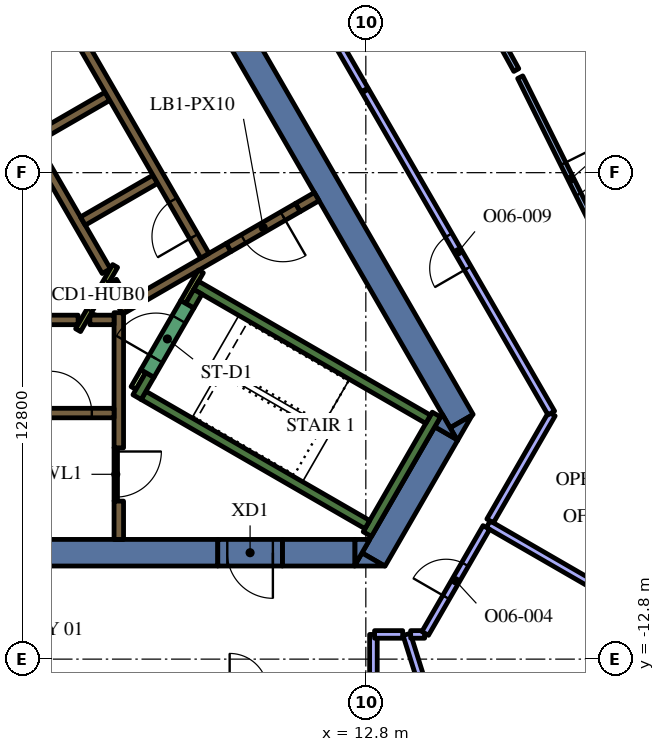
"""IFC4 building model, lengths in metres.
Left out: names, types, materials, properties, quantities, classifications, styles, units other than length and angle.
Written with IfcOpenShell. Run it as: python <this file> out.ifc"""

import sys

from ifc_helpers import new_model, si_unit, direction, frame, frame_2d, origin, place, context, subcontext, project, spatial, polyline, rectangle, outline, extrude, element, fill, save


model = new_model("IFC4")
c1 = context("Model", 3, precision=1e-05, world=origin(), true_north=direction((0.0, 1.0)))
c2 = subcontext(c1, "Body", "Model", "MODEL_VIEW")
j1 = project(units=[si_unit("LENGTHUNIT", "METRE"), si_unit("PLANEANGLEUNIT", "RADIAN")], contexts=[c1])
p1 = place(None, origin())
s1 = spatial("IfcSite", under=j1, at=p1, CompositionType="ELEMENT")
p2 = place(p1, origin())
s2 = spatial("IfcBuilding", under=s1, at=p2, CompositionType="ELEMENT")
p3 = place(p2, frame((0.0, 0.0, 201.6)))
s3 = spatial("IfcBuildingStorey", under=s2, at=p3, CompositionType="ELEMENT", Elevation=201.6)
p4 = place(p3, frame((9.085, 4.264, 0.0), z_axis=(0.0, 0.0, 1.0), x_axis=(0.499998082512, -0.866026510844, 0.0)))
e1 = element("IfcWall", 1, at=p4, inside=s3, PredefinedType="SOLIDWALL", context=c2, shape_type="SweptSolid", body=[
    extrude(rectangle(XDim=12.472, YDim=0.7, at=frame_2d((6.236, 0.0))), origin(), (0.0, 0.0, 1.0), 4.2),
])
p5 = place(p3, origin())
e2 = element("IfcWall", 2, at=p5, inside=s3, PredefinedType="SOLIDWALL", context=c2, shape_type="SweptSolid", body=[
    extrude(outline(polyline([(15.213, -7.05), (15.019, -6.714), (15.601, -6.378), (15.213, -7.05)])), origin(), (0.0, 0.0, 1.0), 4.2),
])
p6 = place(p3, frame((13.003, -10.179, 0.0), z_axis=(0.0, 0.0, 1.0), x_axis=(0.499972675833, 0.866041178825, 0.0)))
e3 = element("IfcWall", 3, at=p6, inside=s3, PredefinedType="SOLIDWALL", context=c2, shape_type="SweptSolid", body=[
    extrude(rectangle(XDim=3.829, YDim=0.7, at=frame_2d((1.915, 0.0))), origin(), (0.0, 0.0, 1.0), 4.2),
])
e4 = element("IfcWall", 4, at=p5, inside=s3, PredefinedType="SOLIDWALL", context=c2, shape_type="SweptSolid", body=[
    extrude(outline(polyline([(12.5, -10.35), (12.698, -10.005), (13.296, -10.35), (12.5, -10.35)])), origin(), (0.0, 0.0, 1.0), 4.2),
])
e5 = element("IfcWall", 5, at=p5, inside=s3, PredefinedType="SOLIDWALL", context=c2, shape_type="SweptSolid", body=[
    extrude(outline(polyline([(14.809, -6.35), (15.197, -7.022), (14.615, -6.686), (14.809, -6.35)])), origin(), (0.0, 0.0, 1.0), 4.2),
])
p7 = place(p3, frame((10.604, -10.0, 0.0), z_axis=(0.0, 0.0, 1.0), x_axis=(1.0, 0.0, 0.0)))
e6 = element("IfcWall", 6, at=p7, inside=s3, PredefinedType="SOLIDWALL", context=c2, shape_type="SweptSolid", body=[
    extrude(rectangle(XDim=1.909, YDim=0.7, at=frame_2d((0.955, 0.0))), origin(), (0.0, 0.0, 1.0), 4.2),
])
e7 = element("IfcWall", 7, at=p5, inside=s3, PredefinedType="SOLIDWALL", context=c2, shape_type="SweptSolid", body=[
    extrude(outline(polyline([(12.904, -9.65), (12.516, -10.322), (12.516, -9.65), (12.904, -9.65)])), origin(), (0.0, 0.0, 1.0), 4.2),
])
p8 = place(p3, frame((8.904, -10.0, 0.0), z_axis=(0.0, 0.0, 1.0), x_axis=(-1.0, 0.0, 0.0)))
e8 = element("IfcWall", 8, at=p8, inside=s3, PredefinedType="SOLIDWALL", context=c2, shape_type="SweptSolid", body=[
    extrude(rectangle(XDim=22.226, YDim=0.7, at=frame_2d((11.113, 0.0))), origin(), (0.0, 0.0, 1.0), 4.2),
])
p9 = place(p3, frame((12.84, -9.511, 0.0), z_axis=(0.0, 0.0, 1.0), x_axis=(0.500048121057, 0.865997619297, 0.0)))
e9 = element("IfcWall", 9, at=p9, inside=s3, PredefinedType="SOLIDWALL", context=c2, shape_type="SweptSolid", body=[
    extrude(rectangle(XDim=3.634, YDim=0.25, at=frame_2d((1.817, 0.0))), origin(), (0.0, 0.0, 1.0), 4.2),
])
p10 = place(p3, frame((12.84, -9.261, 0.0), z_axis=(0.0, 0.0, 1.0), x_axis=(-0.866013990052, 0.500019768644, 0.0)))
e10 = element("IfcWall", 10, at=p10, inside=s3, PredefinedType="SOLIDWALL", context=c2, shape_type="SweptSolid", body=[
    extrude(rectangle(XDim=6.8, YDim=0.25, at=frame_2d((3.4, 0.0))), origin(), (0.0, 0.0, 1.0), 4.2),
])
p11 = place(p3, frame((6.78, -5.906, 0.0), z_axis=(0.0, 0.0, 1.0), x_axis=(0.500223362819, 0.865896406789, 0.0)))
e11 = element("IfcWall", 11, at=p11, inside=s3, PredefinedType="SOLIDWALL", context=c2, shape_type="SweptSolid", body=[
    extrude(rectangle(XDim=0.675, YDim=0.25, at=frame_2d((0.337, 0.0))), origin(), (0.0, 0.0, 1.0), 4.2),
])
p12 = place(p3, frame((8.334, -2.964, 0.0), z_axis=(0.0, 0.0, 1.0), x_axis=(0.866016039709, -0.500016218704, 0.0)))
e12 = element("IfcWall", 12, at=p12, inside=s3, PredefinedType="SOLIDWALL", context=c2, shape_type="SweptSolid", body=[
    extrude(rectangle(XDim=7.05, YDim=0.25, at=frame_2d((3.525, 0.0))), origin(), (0.0, 0.0, 1.0), 4.2),
])
p13 = place(p3, frame((8.168, -3.503, 0.0), z_axis=(0.0, 0.0, 1.0), x_axis=(0.49972245349, 0.866185586049, 0.0)))
e13 = element("IfcWall", 13, at=p13, inside=s3, PredefinedType="SOLIDWALL", context=c2, shape_type="SweptSolid", body=[
    extrude(rectangle(XDim=0.425, YDim=0.25, at=frame_2d((0.212, 0.0))), origin(), (0.0, 0.0, 1.0), 4.2),
])
p14 = place(p3, frame((-5.259, -3.875, 0.0), z_axis=(0.0, 0.0, 1.0), x_axis=(1.0, 0.0, 0.0)))
e14 = element("IfcWall", 14, at=p14, inside=s3, PredefinedType="SOLIDWALL", context=c2, shape_type="SweptSolid", body=[
    extrude(rectangle(XDim=10.489, YDim=0.25, at=frame_2d((5.244, 0.0))), origin(), (0.0, 0.0, 1.0), 4.2),
])
p15 = place(p3, frame((6.3, -7.24, 0.0), z_axis=(0.0, 0.0, 1.0), x_axis=(0.0, 1.0, 0.0)))
e15 = element("IfcWall", 15, at=p15, inside=s3, PredefinedType="SOLIDWALL", context=c2, shape_type="SweptSolid", body=[
    extrude(rectangle(XDim=3.556, YDim=0.25, at=frame_2d((1.778, 0.0))), origin(), (0.0, 0.0, 1.0), 4.2),
])
p16 = place(p3, frame((6.3, -9.65, 0.0), z_axis=(0.0, 0.0, 1.0), x_axis=(0.0, 1.0, 0.0)))
e16 = element("IfcWall", 16, at=p16, inside=s3, PredefinedType="SOLIDWALL", context=c2, shape_type="SweptSolid", body=[
    extrude(rectangle(XDim=1.008, YDim=0.25, at=frame_2d((0.504, 0.0))), origin(), (0.0, 0.0, 1.0), 4.2),
])
p17 = place(p3, frame((5.538, -3.875, 0.0), z_axis=(0.0, 0.0, 1.0), x_axis=(1.0, 0.0, 0.0)))
e17 = element("IfcWall", 17, at=p17, inside=s3, PredefinedType="SOLIDWALL", context=c2, shape_type="SweptSolid", body=[
    extrude(rectangle(XDim=0.637, YDim=0.25, at=frame_2d((0.318, 0.0))), origin(), (0.0, 0.0, 1.0), 4.2),
])
p18 = place(p3, frame((9.19, -1.969, 0.0), z_axis=(0.0, 0.0, 1.0), x_axis=(-0.866057109641, -0.499945079824, 0.0)))
e18 = element("IfcWall", 18, at=p18, inside=s3, PredefinedType="SOLIDWALL", context=c2, shape_type="SweptSolid", body=[
    extrude(rectangle(XDim=3.291, YDim=0.25, at=frame_2d((1.646, 0.0))), origin(), (0.0, 0.0, 1.0), 4.2),
])
p19 = place(p3, frame((6.13, -2.867, 0.0), z_axis=(0.0, 0.0, 1.0), x_axis=(0.500160776593, -0.865932559475, 0.0)))
e19 = element("IfcWall", 19, at=p19, inside=s3, PredefinedType="SOLIDWALL", context=c2, shape_type="SweptSolid", body=[
    extrude(rectangle(XDim=0.627, YDim=0.25, at=frame_2d((0.313, 0.0))), origin(), (0.0, 0.0, 1.0), 4.2),
])
p20 = place(p3, frame((11.507, -0.631, 0.0), z_axis=(0.0, 0.0, 1.0), x_axis=(-0.866093731455, -0.499881634324, 0.0)))
e20 = element("IfcWall", 20, at=p20, inside=s3, PredefinedType="SOLIDWALL", context=c2, shape_type="SweptSolid", body=[
    extrude(rectangle(XDim=0.575, YDim=0.25, at=frame_2d((0.288, 0.0))), origin(), (0.0, 0.0, 1.0), 4.2),
])
p21 = place(p3, frame((5.97, -2.591, 0.0), z_axis=(0.0, 0.0, 1.0), x_axis=(-0.499994469932, 0.866028596547, 0.0)))
e21 = element("IfcWall", 21, at=p21, inside=s3, PredefinedType="SOLIDWALL", context=c2, shape_type="SweptSolid", body=[
    extrude(rectangle(XDim=10.488, YDim=0.25, at=frame_2d((5.244, 0.0))), origin(), (0.0, 0.0, 1.0), 4.2),
])
for number, where, z_axis, x_axis in (
    (22, (2.834, 3.091, 0.0), (0.0, 0.0, 1.0), (0.866, 0.5, 0.0)),
    (23, (4.094, 0.909, 0.0), (0.0, 0.0, 1.0), (0.866, 0.5, 0.0)),
    (24, (5.354, -1.274, 0.0), (0.0, 0.0, 1.0), (0.866, 0.5, 0.0)),
):
    element("IfcWall", number, at=place(p3, frame(where, z_axis=z_axis, x_axis=x_axis)), inside=s3, PredefinedType="SOLIDWALL", context=c2, shape_type="SweptSolid", body=[
        extrude(rectangle(XDim=2.2, YDim=0.25, at=frame_2d((1.1, 0.0))), origin(), (0.0, 0.0, 1.0), 4.2),
    ])
p22 = place(p3, frame((6.945, -5.222, 0.0), z_axis=(0.0, 0.0, 1.0), x_axis=(-0.499818422106, -0.866130212453, 0.0)))
e25 = element("IfcWall", 25, at=p22, inside=s3, PredefinedType="PARTITIONING", context=c2, shape_type="SweptSolid", body=[
    extrude(rectangle(XDim=0.514, YDim=0.15, at=frame_2d((0.257, 0.0))), origin(), (0.0, 0.0, 1.0), 3.45),
])
p23 = place(p3, frame((8.459, -2.599, 0.0), z_axis=(0.0, 0.0, 1.0), x_axis=(-0.500041054325, -0.866001699761, 0.0)))
e26 = element("IfcWall", 26, at=p23, inside=s3, PredefinedType="PARTITIONING", context=c2, shape_type="SweptSolid", body=[
    extrude(rectangle(XDim=0.929, YDim=0.15, at=frame_2d((0.464, 0.0))), origin(), (0.0, 0.0, 1.0), 4.2),
])
p24 = place(p3, frame((-6.175, -6.325, 0.0), z_axis=(0.0, 0.0, 1.0), x_axis=(1.0, 0.0, 0.0)))
e27 = element("IfcWall", 27, at=p24, inside=s3, PredefinedType="SOLIDWALL", context=c2, shape_type="SweptSolid", body=[
    extrude(rectangle(XDim=12.35, YDim=0.25, at=frame_2d((6.175, 0.0))), origin(), (0.0, 0.0, 1.0), 4.2),
])
p25 = place(p24, frame((0.585, 0.0, 0.0)))
e28 = element("IfcOpeningElement", 28, at=p25, cuts=e27, PredefinedType="OPENING", context=c2, shape_type="SweptSolid", body=[
    extrude(rectangle(XDim=1.1, YDim=2.1, at=frame_2d((0.55, 1.05))), frame((0.0, 0.135, 0.0), z_axis=(0.0, -1.0, 0.0), x_axis=(1.0, 0.0, 0.0)), (0.0, 0.0, 1.0), 0.27),
])
p26 = place(p24, frame((3.105, 0.0, 0.0)))
e29 = element("IfcOpeningElement", 29, at=p26, cuts=e27, PredefinedType="OPENING", context=c2, shape_type="SweptSolid", body=[
    extrude(rectangle(XDim=1.1, YDim=2.1, at=frame_2d((0.55, 1.05))), frame((0.0, 0.135, 0.0), z_axis=(0.0, -1.0, 0.0), x_axis=(1.0, 0.0, 0.0)), (0.0, 0.0, 1.0), 0.27),
])
p27 = place(p24, frame((5.625, 0.0, 0.0)))
e30 = element("IfcOpeningElement", 30, at=p27, cuts=e27, PredefinedType="OPENING", context=c2, shape_type="SweptSolid", body=[
    extrude(rectangle(XDim=1.1, YDim=2.1, at=frame_2d((0.55, 1.05))), frame((0.0, 0.135, 0.0), z_axis=(0.0, -1.0, 0.0), x_axis=(1.0, 0.0, 0.0)), (0.0, 0.0, 1.0), 0.27),
])
p28 = place(p24, frame((8.145, 0.0, 0.0)))
e31 = element("IfcOpeningElement", 31, at=p28, cuts=e27, PredefinedType="OPENING", context=c2, shape_type="SweptSolid", body=[
    extrude(rectangle(XDim=1.1, YDim=2.1, at=frame_2d((0.55, 1.05))), frame((0.0, 0.135, 0.0), z_axis=(0.0, -1.0, 0.0), x_axis=(1.0, 0.0, 0.0)), (0.0, 0.0, 1.0), 0.27),
])
p29 = place(p24, frame((10.665, 0.0, 0.0)))
e32 = element("IfcOpeningElement", 32, at=p29, cuts=e27, PredefinedType="OPENING", context=c2, shape_type="SweptSolid", body=[
    extrude(rectangle(XDim=1.1, YDim=2.1, at=frame_2d((0.55, 1.05))), frame((0.0, 0.135, 0.0), z_axis=(0.0, -1.0, 0.0), x_axis=(1.0, 0.0, 0.0)), (0.0, 0.0, 1.0), 0.27),
])
p30 = place(p3, frame((8.565, -2.185, 0.0), z_axis=(0.0, 0.0, 1.0), x_axis=(-0.499997954832, 0.866026584559, 0.0)))
e33 = element("IfcWall", 33, at=p30, inside=s3, PredefinedType="SOLIDWALL", context=c2, shape_type="SweptSolid", body=[
    extrude(rectangle(XDim=12.35, YDim=0.25, at=frame_2d((6.175, 0.0))), origin(), (0.0, 0.0, 1.0), 4.2),
])
p31 = place(p30, frame((0.585, 0.0, 0.0)))
e34 = element("IfcOpeningElement", 34, at=p31, cuts=e33, PredefinedType="OPENING", context=c2, shape_type="SweptSolid", body=[
    extrude(rectangle(XDim=1.1, YDim=2.1, at=frame_2d((0.55, 1.05))), frame((0.0, 0.135, 0.0), z_axis=(0.0, -1.0, 0.0), x_axis=(1.0, 0.0, 0.0)), (0.0, 0.0, 1.0), 0.27),
])
p32 = place(p3, frame((7.053, -5.284, 0.0), z_axis=(0.0, 0.0, 1.0), x_axis=(0.500078061341, 0.865980330357, 0.0)))
e35 = element("IfcWall", 35, at=p32, inside=s3, PredefinedType="SOLIDWALL", context=c2, shape_type="SweptSolid", body=[
    extrude(rectangle(XDim=2.1, YDim=0.4, at=frame_2d((1.05, 0.0))), origin(), (0.0, 0.0, 1.0), 4.2),
])
p33 = place(p32, frame((0.45, 0.0, 0.0)))
e36 = element("IfcOpeningElement", 36, at=p33, cuts=e35, PredefinedType="OPENING", context=c2, shape_type="SweptSolid", body=[
    extrude(rectangle(XDim=1.2, YDim=2.1, at=frame_2d((0.6, 1.05))), frame((0.0, 0.21, 0.0), z_axis=(0.0, -1.0, 0.0), x_axis=(1.0, 0.0, 0.0)), (0.0, 0.0, 1.0), 0.42),
])
p34 = place(p3, frame((6.203, -2.456, 0.0), z_axis=(0.0, 0.0, 1.0), x_axis=(-0.500043961785, -0.866000020948, 0.0)))
e37 = element("IfcWall", 37, at=p34, inside=s3, PredefinedType="PARTITIONING", context=c2, shape_type="SweptSolid", body=[
    extrude(rectangle(XDim=1.95, YDim=0.15, at=frame_2d((0.975, 0.0))), origin(), (0.0, 0.0, 1.0), 4.2),
])
p35 = place(p34, frame((0.45, 0.0, 0.0)))
e38 = element("IfcOpeningElement", 38, at=p35, cuts=e37, PredefinedType="OPENING", context=c2, shape_type="SweptSolid", body=[
    extrude(rectangle(XDim=0.9, YDim=2.1, at=frame_2d((0.45, 1.05))), frame((0.0, 0.085, 0.0), z_axis=(0.0, -1.0, 0.0), x_axis=(1.0, 0.0, 0.0)), (0.0, 0.0, 1.0), 0.17),
])
p36 = place(p3, frame((6.22, -7.237, 0.0), z_axis=(0.0, 0.0, 1.0), x_axis=(0.0, -1.0, 0.0)))
e39 = element("IfcWall", 39, at=p36, inside=s3, PredefinedType="PARTITIONING", context=c2, shape_type="SweptSolid", body=[
    extrude(rectangle(XDim=1.4, YDim=0.09, at=frame_2d((0.7, 0.0))), origin(), (0.0, 0.0, 1.0), 3.45),
])
p37 = place(p36, frame((0.1, 0.0, 0.0)))
e40 = element("IfcOpeningElement", 40, at=p37, cuts=e39, PredefinedType="OPENING", context=c2, shape_type="SweptSolid", body=[
    extrude(rectangle(XDim=1.2, YDim=2.1, at=frame_2d((0.6, 1.05))), frame((0.0, 0.055, 0.0), z_axis=(0.0, -1.0, 0.0), x_axis=(1.0, 0.0, 0.0)), (0.0, 0.0, 1.0), 0.11),
])
p38 = place(p3, frame((11.009, -0.919, 0.0), z_axis=(0.0, 0.0, 1.0), x_axis=(-0.866059744384, -0.49994051562, 0.0)))
e41 = element("IfcWall", 41, at=p38, inside=s3, PredefinedType="SOLIDWALL", context=c2, shape_type="SweptSolid", body=[
    extrude(rectangle(XDim=2.1, YDim=0.25, at=frame_2d((1.05, 0.0))), origin(), (0.0, 0.0, 1.0), 4.2),
])
p39 = place(p38, frame((0.45, 0.0, 0.0)))
e42 = element("IfcOpeningElement", 42, at=p39, cuts=e41, PredefinedType="OPENING", context=c2, shape_type="SweptSolid", body=[
    extrude(rectangle(XDim=1.2, YDim=2.1, at=frame_2d((0.6, 1.05))), frame((0.0, 0.135, 0.0), z_axis=(0.0, -1.0, 0.0), x_axis=(1.0, 0.0, 0.0)), (0.0, 0.0, 1.0), 0.27),
])
p40 = place(p3, frame((10.604, -10.0, 0.0), z_axis=(0.0, 0.0, 1.0), x_axis=(-1.0, 0.0, 0.0)))
e43 = element("IfcWall", 43, at=p40, inside=s3, PredefinedType="SOLIDWALL", context=c2, shape_type="SweptSolid", body=[
    extrude(rectangle(XDim=1.7, YDim=0.7, at=frame_2d((0.85, 0.0))), origin(), (0.0, 0.0, 1.0), 4.2),
])
p41 = place(p40, frame((0.25, 0.0, 0.0)))
e44 = element("IfcOpeningElement", 44, at=p41, cuts=e43, PredefinedType="OPENING", context=c2, shape_type="SweptSolid", body=[
    extrude(rectangle(XDim=1.2, YDim=2.1, at=frame_2d((0.6, 1.05))), frame((0.0, 0.36, 0.0), z_axis=(0.0, -1.0, 0.0), x_axis=(1.0, 0.0, 0.0)), (0.0, 0.0, 1.0), 0.72),
])
p42 = place(p3, frame((13.875, -12.15, 0.0), z_axis=(0.0, 0.0, 1.0), x_axis=(0.3005606746, -0.953762696316, 0.0)))
e45 = element("IfcWall", 45, at=p42, inside=s3, PredefinedType="PARTITIONING", context=c2, shape_type="SweptSolid", body=[
    extrude(rectangle(XDim=6.9, YDim=0.2, at=frame_2d((3.45, 0.0))), origin(), (0.0, 0.0, 1.0), 3.45),
])
p43 = place(p3, frame((13.0, -13.62, 0.0), z_axis=(0.0, 0.0, 1.0), x_axis=(0.0, 1.0, 0.0)))
e46 = element("IfcWall", 46, at=p43, inside=s3, PredefinedType="PARTITIONING", context=c2, shape_type="SweptSolid", body=[
    extrude(rectangle(XDim=1.47, YDim=0.2, at=frame_2d((0.735, 0.0))), origin(), (0.0, 0.0, 1.0), 3.45),
])
p44 = place(p3, frame((13.03, -12.15, 0.0), z_axis=(0.0, 0.0, 1.0), x_axis=(1.0, 0.0, 0.0)))
e47 = element("IfcWall", 47, at=p44, inside=s3, PredefinedType="PARTITIONING", context=c2, shape_type="SweptSolid", body=[
    extrude(rectangle(XDim=0.74, YDim=0.2, at=frame_2d((0.37, 0.0))), origin(), (0.0, 0.0, 1.0), 3.45),
])
p45 = place(p3, frame((16.021, -9.25, 0.0), z_axis=(0.0, 0.0, 1.0), x_axis=(0.86602692059, -0.499997372806, 0.0)))
e48 = element("IfcWall", 48, at=p45, inside=s3, PredefinedType="PARTITIONING", context=c2, shape_type="SweptSolid", body=[
    extrude(rectangle(XDim=6.765, YDim=0.2, at=frame_2d((3.382, 0.0))), origin(), (0.0, 0.0, 1.0), 3.45),
])
p46 = place(p3, frame((13.98, -12.15, 0.0), z_axis=(0.0, 0.0, 1.0), x_axis=(1.0, 0.0, 0.0)))
e49 = element("IfcWall", 49, at=p46, inside=s3, PredefinedType="PARTITIONING", context=c2, shape_type="SweptSolid", body=[
    extrude(rectangle(XDim=0.367, YDim=0.2, at=frame_2d((0.184, 0.0))), origin(), (0.0, 0.0, 1.0), 3.45),
])
p47 = place(p3, frame((14.362, -12.124, 0.0), z_axis=(0.0, 0.0, 1.0), x_axis=(0.500022299258, 0.866012528919, 0.0)))
e50 = element("IfcWall", 50, at=p47, inside=s3, PredefinedType="PARTITIONING", context=c2, shape_type="SweptSolid", body=[
    extrude(rectangle(XDim=3.219, YDim=0.2, at=frame_2d((1.609, 0.0))), origin(), (0.0, 0.0, 1.0), 3.45),
])
p48 = place(p47, frame((1.1, 0.0, 0.0)))
e51 = element("IfcOpeningElement", 51, at=p48, cuts=e50, PredefinedType="OPENING", context=c2, shape_type="SweptSolid", body=[
    extrude(rectangle(XDim=1.0, YDim=2.1, at=frame_2d((0.5, 1.05))), frame((0.0, 0.11, 0.0), z_axis=(0.0, -1.0, 0.0), x_axis=(1.0, 0.0, 0.0)), (0.0, 0.0, 1.0), 0.22),
])
p49 = place(p3, frame((16.863, 2.513, 0.0), z_axis=(0.0, 0.0, 1.0), x_axis=(0.445159947046, -0.895451071553, 0.0)))
e52 = element("IfcWall", 52, at=p49, inside=s3, PredefinedType="PARTITIONING", context=c2, shape_type="SweptSolid", body=[
    extrude(rectangle(XDim=6.043, YDim=0.15, at=frame_2d((3.021, 0.0))), origin(), (0.0, 0.0, 1.0), 3.45),
])
p50 = place(p49, frame((2.542, 0.0, 0.0)))
e53 = element("IfcOpeningElement", 53, at=p50, cuts=e52, PredefinedType="OPENING", context=c2, shape_type="SweptSolid", body=[
    extrude(rectangle(XDim=0.9, YDim=2.1, at=frame_2d((0.45, 1.05))), frame((0.0, 0.085, 0.0), z_axis=(0.0, -1.0, 0.0), x_axis=(1.0, 0.0, 0.0)), (0.0, 0.0, 1.0), 0.17),
])
p51 = place(p3, frame((16.76, 2.7, 0.0), z_axis=(0.0, 0.0, 1.0), x_axis=(-0.481907755985, 0.876221955169, 0.0)))
e54 = element("IfcWall", 54, at=p51, inside=s3, PredefinedType="PARTITIONING", context=c2, shape_type="SweptSolid", body=[
    extrude(rectangle(XDim=5.967, YDim=0.15, at=frame_2d((2.984, 0.0))), origin(), (0.0, 0.0, 1.0), 3.45),
])
p52 = place(p3, frame((12.772, 2.178, 0.0), z_axis=(0.0, 0.0, 1.0), x_axis=(-0.5000018851, 0.866024315419, 0.0)))
e55 = element("IfcWall", 55, at=p52, inside=s3, PredefinedType="PARTITIONING", context=c2, shape_type="SweptSolid", body=[
    extrude(rectangle(XDim=9.0, YDim=0.2, at=frame_2d((4.5, 0.0))), origin(), (0.0, 0.0, 1.0), 3.45),
])
p53 = place(p3, frame((16.072, -9.163, 0.0), z_axis=(0.0, 0.0, 1.0), x_axis=(0.500010870188, 0.866019127788, 0.0)))
e56 = element("IfcWall", 56, at=p53, inside=s3, PredefinedType="PARTITIONING", context=c2, shape_type="SweptSolid", body=[
    extrude(rectangle(XDim=3.249, YDim=0.2, at=frame_2d((1.624, 0.0))), origin(), (0.0, 0.0, 1.0), 3.45),
])
p54 = place(p3, frame((17.681, -6.324, 0.0), z_axis=(0.0, 0.0, 1.0), x_axis=(-0.500021153861, 0.866013190252, 0.0)))
e57 = element("IfcWall", 57, at=p54, inside=s3, PredefinedType="PARTITIONING", context=c2, shape_type="SweptSolid", body=[
    extrude(rectangle(XDim=9.787, YDim=0.2, at=frame_2d((4.894, 0.0))), origin(), (0.0, 0.0, 1.0), 3.45),
])
p55 = place(p54, frame((4.4, 0.0, 0.0)))
e58 = element("IfcOpeningElement", 58, at=p55, cuts=e57, PredefinedType="OPENING", context=c2, shape_type="SweptSolid", body=[
    extrude(rectangle(XDim=1.0, YDim=2.1, at=frame_2d((0.5, 1.05))), frame((0.0, 0.11, 0.0), z_axis=(0.0, -1.0, 0.0), x_axis=(1.0, 0.0, 0.0)), (0.0, 0.0, 1.0), 0.22),
])
p56 = place(p29, origin())
e59 = element("IfcDoor", 59, at=p56, inside=s3, OperationType="DOUBLE_DOOR_SLIDING", PredefinedType="DOOR", context=c2, shape_type="SweptSolid", body=[
    extrude(rectangle(XDim=1.1, YDim=2.1, at=frame_2d((0.55, 1.05))), frame((0.0, 0.025, 0.0), z_axis=(0.0, -1.0, 0.0), x_axis=(1.0, 0.0, 0.0)), (0.0, 0.0, 1.0), 0.05),
])
fill(e32, e59)
p57 = place(p31, origin())
e60 = element("IfcDoor", 60, at=p57, inside=s3, OperationType="DOUBLE_DOOR_SLIDING", PredefinedType="DOOR", context=c2, shape_type="SweptSolid", body=[
    extrude(rectangle(XDim=1.1, YDim=2.1, at=frame_2d((0.55, 1.05))), frame((0.0, 0.025, 0.0), z_axis=(0.0, -1.0, 0.0), x_axis=(1.0, 0.0, 0.0)), (0.0, 0.0, 1.0), 0.05),
])
fill(e34, e60)
p58 = place(p33, origin())
e61 = element("IfcDoor", 61, at=p58, inside=s3, OperationType="SINGLE_SWING_LEFT", PredefinedType="DOOR", context=c2, shape_type="SweptSolid", body=[
    extrude(rectangle(XDim=1.2, YDim=2.1, at=frame_2d((0.6, 1.05))), frame((0.0, 0.025, 0.0), z_axis=(0.0, -1.0, 0.0), x_axis=(1.0, 0.0, 0.0)), (0.0, 0.0, 1.0), 0.05),
])
fill(e36, e61)
p59 = place(p35, origin())
e62 = element("IfcDoor", 62, at=p59, inside=s3, OperationType="SINGLE_SWING_LEFT", PredefinedType="DOOR", context=c2, shape_type="SweptSolid", body=[
    extrude(rectangle(XDim=0.9, YDim=2.1, at=frame_2d((0.45, 1.05))), frame((0.0, 0.025, 0.0), z_axis=(0.0, -1.0, 0.0), x_axis=(1.0, 0.0, 0.0)), (0.0, 0.0, 1.0), 0.05),
])
fill(e38, e62)
p60 = place(p37, origin())
e63 = element("IfcDoor", 63, at=p60, inside=s3, OperationType="SINGLE_SWING_LEFT", PredefinedType="DOOR", context=c2, shape_type="SweptSolid", body=[
    extrude(rectangle(XDim=1.2, YDim=2.1, at=frame_2d((0.6, 1.05))), frame((0.0, 0.025, 0.0), z_axis=(0.0, -1.0, 0.0), x_axis=(1.0, 0.0, 0.0)), (0.0, 0.0, 1.0), 0.05),
])
fill(e40, e63)
p61 = place(p39, origin())
e64 = element("IfcDoor", 64, at=p61, inside=s3, OperationType="SINGLE_SWING_LEFT", PredefinedType="DOOR", context=c2, shape_type="SweptSolid", body=[
    extrude(rectangle(XDim=1.2, YDim=2.1, at=frame_2d((0.6, 1.05))), frame((0.0, 0.025, 0.0), z_axis=(0.0, -1.0, 0.0), x_axis=(1.0, 0.0, 0.0)), (0.0, 0.0, 1.0), 0.05),
])
fill(e42, e64)
p62 = place(p41, origin())
e65 = element("IfcDoor", 65, at=p62, inside=s3, OperationType="SINGLE_SWING_LEFT", PredefinedType="DOOR", context=c2, shape_type="SweptSolid", body=[
    extrude(rectangle(XDim=1.2, YDim=2.1, at=frame_2d((0.6, 1.05))), frame((0.0, 0.025, 0.0), z_axis=(0.0, -1.0, 0.0), x_axis=(1.0, 0.0, 0.0)), (0.0, 0.0, 1.0), 0.05),
])
fill(e44, e65)
p63 = place(p48, origin())
e66 = element("IfcDoor", 66, at=p63, inside=s3, OperationType="SINGLE_SWING_LEFT", PredefinedType="DOOR", context=c2, shape_type="SweptSolid", body=[
    extrude(rectangle(XDim=1.0, YDim=2.1, at=frame_2d((0.5, 1.05))), frame((0.0, 0.025, 0.0), z_axis=(0.0, -1.0, 0.0), x_axis=(1.0, 0.0, 0.0)), (0.0, 0.0, 1.0), 0.05),
])
fill(e51, e66)
p64 = place(p50, origin())
e67 = element("IfcDoor", 67, at=p64, inside=s3, OperationType="SINGLE_SWING_LEFT", PredefinedType="DOOR", context=c2, shape_type="SweptSolid", body=[
    extrude(rectangle(XDim=0.9, YDim=2.1, at=frame_2d((0.45, 1.05))), frame((0.0, 0.025, 0.0), z_axis=(0.0, -1.0, 0.0), x_axis=(1.0, 0.0, 0.0)), (0.0, 0.0, 1.0), 0.05),
])
fill(e53, e67)
p65 = place(p55, origin())
e68 = element("IfcDoor", 68, at=p65, inside=s3, OperationType="SINGLE_SWING_RIGHT", PredefinedType="DOOR", context=c2, shape_type="SweptSolid", body=[
    extrude(rectangle(XDim=1.0, YDim=2.1, at=frame_2d((0.5, 1.05))), frame((0.0, 0.025, 0.0), z_axis=(0.0, -1.0, 0.0), x_axis=(1.0, 0.0, 0.0)), (0.0, 0.0, 1.0), 0.05),
])
fill(e58, e68)
save(model, sys.argv[1])
